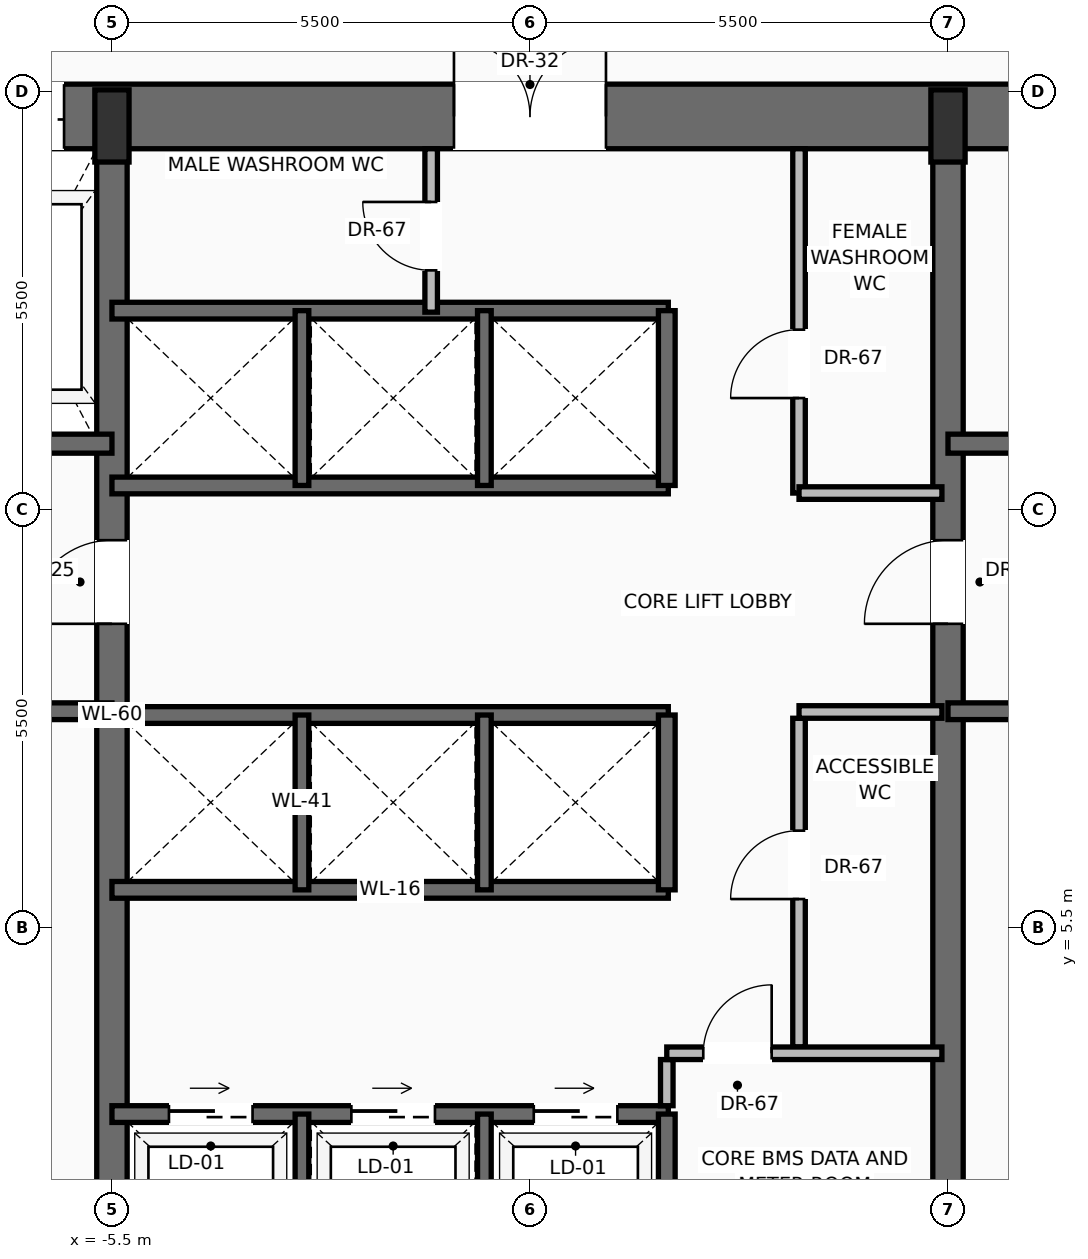
"""IFC4 building model, lengths in metres.
Left out: names, types, materials, properties, quantities, classifications, styles, units other than length and angle.
Written with IfcOpenShell. Run it as: python <this file> out.ifc"""

import sys

from ifc_helpers import new_model, si_unit, direction, frame, frame_2d, origin, origin_2d, place, context, subcontext, project, spatial, rectangle, extrude, source, transform, mapped, element, fill, save


model = new_model("IFC4")
c1 = context("Model", 3, precision=1e-05, world=origin(), true_north=direction((0.0, 1.0)))
c2 = subcontext(c1, "Body", "Model", "MODEL_VIEW")
j1 = project(units=[si_unit("LENGTHUNIT", "METRE"), si_unit("PLANEANGLEUNIT", "RADIAN")], contexts=[c1])
p1 = place(None, origin())
s1 = spatial("IfcSite", under=j1, at=p1, CompositionType="ELEMENT")
p2 = place(p1, origin())
s2 = spatial("IfcBuilding", under=s1, at=p2, CompositionType="ELEMENT")
p3 = place(p2, frame((0.0, 0.0, 42.3)))
s3 = spatial("IfcBuildingStorey", under=s2, at=p3, CompositionType="ELEMENT", Elevation=42.3)
p4 = place(p3, frame((-11.0, 16.175, 0.0), z_axis=(0.0, 0.0, 1.0), x_axis=(1.0, 0.0, 0.0)))
e1 = element("IfcWall", 1, at=p4, inside=s3, PredefinedType="SHEAR", context=c2, shape_type="SweptSolid", body=[
    extrude(rectangle(XDim=22.0, YDim=0.85, at=frame_2d((11.0, 0.0))), origin(), (0.0, 0.0, 1.0), 3.45),
])
p5 = place(p4, frame((3.57, 0.0, 0.0)))
e2 = element("IfcOpeningElement", 2, at=p5, cuts=e1, PredefinedType="OPENING", context=c2, shape_type="SweptSolid", body=[
    extrude(rectangle(XDim=1.3, YDim=2.3, at=frame_2d((0.65, 1.15))), frame((0.0, 0.435, 0.0), z_axis=(0.0, -1.0, 0.0), x_axis=(1.0, 0.0, 0.0)), (0.0, 0.0, 1.0), 0.87),
])
p6 = place(p4, frame((10.0, 0.0, 0.0)))
e3 = element("IfcOpeningElement", 3, at=p6, cuts=e1, PredefinedType="OPENING", context=c2, shape_type="SweptSolid", body=[
    extrude(rectangle(XDim=2.0, YDim=2.4, at=frame_2d((1.0, 1.2))), frame((0.0, 0.435, 0.0), z_axis=(0.0, -1.0, 0.0), x_axis=(1.0, 0.0, 0.0)), (0.0, 0.0, 1.0), 0.87),
])
p7 = place(p3, frame((-5.5, 0.425, 0.0), z_axis=(0.0, 0.0, 1.0), x_axis=(0.0, 1.0, 0.0)))
e4 = element("IfcWall", 4, at=p7, inside=s3, PredefinedType="SHEAR", context=c2, shape_type="SweptSolid", body=[
    extrude(rectangle(XDim=15.75, YDim=0.4, at=frame_2d((7.875, 0.0))), origin(), (0.0, 0.0, 1.0), 3.45),
])
p8 = place(p7, frame((9.075, 0.0, 0.0)))
e5 = element("IfcOpeningElement", 5, at=p8, cuts=e4, PredefinedType="OPENING", context=c2, shape_type="SweptSolid", body=[
    extrude(rectangle(XDim=1.1, YDim=2.2, at=frame_2d((0.55, 1.1))), frame((0.0, 0.21, 0.0), z_axis=(0.0, -1.0, 0.0), x_axis=(1.0, 0.0, 0.0)), (0.0, 0.0, 1.0), 0.42),
])
p9 = place(p3, frame((5.5, 0.425, 0.0), z_axis=(0.0, 0.0, 1.0), x_axis=(0.0, 1.0, 0.0)))
e6 = element("IfcWall", 6, at=p9, inside=s3, PredefinedType="SHEAR", context=c2, shape_type="SweptSolid", body=[
    extrude(rectangle(XDim=15.75, YDim=0.4, at=frame_2d((7.875, 0.0))), origin(), (0.0, 0.0, 1.0), 3.45),
])
p10 = place(p9, frame((9.075, 0.0, 0.0)))
e7 = element("IfcOpeningElement", 7, at=p10, cuts=e6, PredefinedType="OPENING", context=c2, shape_type="SweptSolid", body=[
    extrude(rectangle(XDim=1.1, YDim=2.2, at=frame_2d((0.55, 1.1))), frame((0.0, 0.21, 0.0), z_axis=(0.0, -1.0, 0.0), x_axis=(1.0, 0.0, 0.0)), (0.0, 0.0, 1.0), 0.42),
])
m1 = source(origin(), c2, "Body", "SweptSolid", [
    extrude(rectangle(XDim=0.45, YDim=0.95, at=origin_2d()), origin(), (0.0, 0.0, 1.0), 3.7),
])
for number, where, z_axis, x_axis in (
    (8, (-5.5, 16.05, 0.0), (0.0, 0.0, 1.0), (1.0, 0.0, 0.0)),
    (9, (5.5, 16.05, 0.0), (0.0, 0.0, 1.0), (1.0, 0.0, 0.0)),
):
    element("IfcColumn", number, at=place(p3, frame(where, z_axis=z_axis, x_axis=x_axis)), inside=s3, PredefinedType="PILASTER", context=c2, shape_type="MappedRepresentation", body=[
        mapped(m1, transform((0.0, 0.0, 0.0), scale=1.0)),
    ])
p11 = place(p3, frame((-5.5, 8.35, 0.0), z_axis=(0.0, 0.0, 1.0), x_axis=(-1.0, 0.0, 0.0)))
e10 = element("IfcWall", 10, at=p11, inside=s3, PredefinedType="SOLIDWALL", context=c2, shape_type="SweptSolid", body=[
    extrude(rectangle(XDim=4.65, YDim=0.22, at=frame_2d((2.325, 0.0))), origin(), (0.0, 0.0, 1.0), 3.45),
])
p12 = place(p11, frame((2.5, 0.0, 0.0)))
e11 = element("IfcOpeningElement", 11, at=p12, cuts=e10, PredefinedType="OPENING", context=c2, shape_type="SweptSolid", body=[
    extrude(rectangle(XDim=1.15, YDim=2.2, at=frame_2d((0.575, 1.1))), frame((0.0, 0.12, 0.0), z_axis=(0.0, -1.0, 0.0), x_axis=(1.0, 0.0, 0.0)), (0.0, 0.0, 1.0), 0.24),
])
p13 = place(p3, frame((-5.5, 11.87, 0.0), z_axis=(0.0, 0.0, 1.0), x_axis=(-1.0, 0.0, 0.0)))
e12 = element("IfcWall", 12, at=p13, inside=s3, PredefinedType="SOLIDWALL", context=c2, shape_type="SweptSolid", body=[
    extrude(rectangle(XDim=4.65, YDim=0.25, at=frame_2d((2.325, 0.0))), origin(), (0.0, 0.0, 1.0), 3.45),
])
p14 = place(p13, frame((2.95, 0.0, 0.0)))
e13 = element("IfcOpeningElement", 13, at=p14, cuts=e12, PredefinedType="OPENING", context=c2, shape_type="SweptSolid", body=[
    extrude(rectangle(XDim=1.2, YDim=2.25, at=frame_2d((0.6, 1.125))), frame((0.0, 0.135, 0.0), z_axis=(0.0, -1.0, 0.0), x_axis=(1.0, 0.0, 0.0)), (0.0, 0.0, 1.0), 0.27),
])
p15 = place(p3, frame((10.15, 8.35, 0.0), z_axis=(0.0, 0.0, 1.0), x_axis=(-1.0, 0.0, 0.0)))
e14 = element("IfcWall", 14, at=p15, inside=s3, PredefinedType="SOLIDWALL", context=c2, shape_type="SweptSolid", body=[
    extrude(rectangle(XDim=4.65, YDim=0.22, at=frame_2d((2.325, 0.0))), origin(), (0.0, 0.0, 1.0), 3.45),
])
p16 = place(p15, frame((1.0, 0.0, 0.0)))
e15 = element("IfcOpeningElement", 15, at=p16, cuts=e14, PredefinedType="OPENING", context=c2, shape_type="SweptSolid", body=[
    extrude(rectangle(XDim=1.15, YDim=2.2, at=frame_2d((0.575, 1.1))), frame((0.0, 0.12, 0.0), z_axis=(0.0, -1.0, 0.0), x_axis=(1.0, 0.0, 0.0)), (0.0, 0.0, 1.0), 0.24),
])
p17 = place(p3, frame((10.15, 11.87, 0.0), z_axis=(0.0, 0.0, 1.0), x_axis=(-1.0, 0.0, 0.0)))
e16 = element("IfcWall", 16, at=p17, inside=s3, PredefinedType="SOLIDWALL", context=c2, shape_type="SweptSolid", body=[
    extrude(rectangle(XDim=4.65, YDim=0.25, at=frame_2d((2.325, 0.0))), origin(), (0.0, 0.0, 1.0), 3.45),
])
p18 = place(p17, frame((0.5, 0.0, 0.0)))
e17 = element("IfcOpeningElement", 17, at=p18, cuts=e16, PredefinedType="OPENING", context=c2, shape_type="SweptSolid", body=[
    extrude(rectangle(XDim=1.2, YDim=2.25, at=frame_2d((0.6, 1.125))), frame((0.0, 0.135, 0.0), z_axis=(0.0, -1.0, 0.0), x_axis=(1.0, 0.0, 0.0)), (0.0, 0.0, 1.0), 0.27),
])
p19 = place(p3, frame((-5.5, 3.05, 0.0), z_axis=(0.0, 0.0, 1.0), x_axis=(1.0, 0.0, 0.0)))
e18 = element("IfcWall", 18, at=p19, inside=s3, PredefinedType="SOLIDWALL", context=c2, shape_type="SweptSolid", body=[
    extrude(rectangle(XDim=7.32, YDim=0.22, at=frame_2d((3.66, 0.0))), origin(), (0.0, 0.0, 1.0), 3.45),
])
p20 = place(p19, frame((0.75, 0.0, 0.0)))
e19 = element("IfcOpeningElement", 19, at=p20, cuts=e18, PredefinedType="OPENING", context=c2, shape_type="SweptSolid", body=[
    extrude(rectangle(XDim=1.1, YDim=2.2, at=frame_2d((0.55, 1.1))), frame((0.0, 0.12, 0.0), z_axis=(0.0, -1.0, 0.0), x_axis=(1.0, 0.0, 0.0)), (0.0, 0.0, 1.0), 0.24),
])
p21 = place(p19, frame((3.15, 0.0, 0.0)))
e20 = element("IfcOpeningElement", 20, at=p21, cuts=e18, PredefinedType="OPENING", context=c2, shape_type="SweptSolid", body=[
    extrude(rectangle(XDim=1.1, YDim=2.2, at=frame_2d((0.55, 1.1))), frame((0.0, 0.12, 0.0), z_axis=(0.0, -1.0, 0.0), x_axis=(1.0, 0.0, 0.0)), (0.0, 0.0, 1.0), 0.24),
])
p22 = place(p19, frame((5.55, 0.0, 0.0)))
e21 = element("IfcOpeningElement", 21, at=p22, cuts=e18, PredefinedType="OPENING", context=c2, shape_type="SweptSolid", body=[
    extrude(rectangle(XDim=1.1, YDim=2.2, at=frame_2d((0.55, 1.1))), frame((0.0, 0.12, 0.0), z_axis=(0.0, -1.0, 0.0), x_axis=(1.0, 0.0, 0.0)), (0.0, 0.0, 1.0), 0.24),
])
p23 = place(p3, frame((1.8, 0.85, 0.0), z_axis=(0.0, 0.0, 1.0), x_axis=(0.0, 1.0, 0.0)))
e22 = element("IfcWall", 22, at=p23, inside=s3, PredefinedType="SOLIDWALL", context=c2, shape_type="SweptSolid", body=[
    extrude(rectangle(XDim=2.2, YDim=0.22, at=frame_2d((1.1, 0.0))), origin(), (0.0, 0.0, 1.0), 3.45),
])
for number, where, z_axis, x_axis in (
    (23, (-3.0, 0.85, 0.0), (0.0, 0.0, 1.0), (0.0, 1.0, 0.0)),
    (24, (-0.6, 0.85, 0.0), (0.0, 0.0, 1.0), (0.0, 1.0, 0.0)),
):
    element("IfcWall", number, at=place(p3, frame(where, z_axis=z_axis, x_axis=x_axis)), inside=s3, PredefinedType="SOLIDWALL", context=c2, shape_type="SweptSolid", body=[
        extrude(rectangle(XDim=2.2, YDim=0.18, at=frame_2d((1.1, 0.0))), origin(), (0.0, 0.0, 1.0), 3.45),
    ])
p24 = place(p3, frame((1.8, 3.16, 0.0), z_axis=(0.0, 0.0, 1.0), x_axis=(0.0, 1.0, 0.0)))
e25 = element("IfcWall", 25, at=p24, inside=s3, PredefinedType="PARTITIONING", context=c2, shape_type="SweptSolid", body=[
    extrude(rectangle(XDim=0.608, YDim=0.165, at=frame_2d((0.304, 0.0))), origin(), (0.0, 0.0, 1.0), 3.442),
])
p25 = place(p3, frame((3.54, 3.933, 0.0), z_axis=(0.0, 0.0, 1.0), x_axis=(0.0, 1.0, 0.0)))
e26 = element("IfcWall", 26, at=p25, inside=s3, PredefinedType="PARTITIONING", context=c2, shape_type="SweptSolid", body=[
    extrude(rectangle(XDim=4.325, YDim=0.165, at=frame_2d((2.163, 0.0))), origin(), (0.0, 0.0, 1.0), 3.442),
])
p26 = place(p25, frame((1.946, 0.0, 0.0)))
e27 = element("IfcOpeningElement", 27, at=p26, cuts=e26, PredefinedType="OPENING", context=c2, shape_type="SweptSolid", body=[
    extrude(rectangle(XDim=0.9, YDim=2.1, at=frame_2d((0.45, 1.05))), frame((0.0, 0.093, 0.0), z_axis=(0.0, -1.0, 0.0), x_axis=(1.0, 0.0, 0.0)), (0.0, 0.0, 1.0), 0.185),
])
p27 = place(p3, frame((3.54, 8.34, 0.0), z_axis=(0.0, 0.0, 1.0), x_axis=(1.0, 0.0, 0.0)))
e28 = element("IfcWall", 28, at=p27, inside=s3, PredefinedType="PARTITIONING", context=c2, shape_type="SweptSolid", body=[
    extrude(rectangle(XDim=1.88, YDim=0.165, at=frame_2d((0.94, 0.0))), origin(), (0.0, 0.0, 1.0), 3.442),
])
p28 = place(p3, frame((1.8, 3.85, 0.0), z_axis=(0.0, 0.0, 1.0), x_axis=(1.0, 0.0, 0.0)))
e29 = element("IfcWall", 29, at=p28, inside=s3, PredefinedType="PARTITIONING", context=c2, shape_type="SweptSolid", body=[
    extrude(rectangle(XDim=3.62, YDim=0.165, at=frame_2d((1.81, 0.0))), origin(), (0.0, 0.0, 1.0), 3.442),
])
p29 = place(p28, frame((0.48, 0.0, 0.0)))
e30 = element("IfcOpeningElement", 30, at=p29, cuts=e29, PredefinedType="OPENING", context=c2, shape_type="SweptSolid", body=[
    extrude(rectangle(XDim=0.9, YDim=2.1, at=frame_2d((0.45, 1.05))), frame((0.0, 0.093, 0.0), z_axis=(0.0, -1.0, 0.0), x_axis=(1.0, 0.0, 0.0)), (0.0, 0.0, 1.0), 0.185),
])
for number, where, z_axis, x_axis in (
    (31, (-5.5, 6.0, 0.0), (0.0, 0.0, 1.0), (1.0, 0.0, 0.0)),
    (32, (-5.5, 8.3, 0.0), (0.0, 0.0, 1.0), (1.0, 0.0, 0.0)),
):
    element("IfcWall", number, at=place(p3, frame(where, z_axis=z_axis, x_axis=x_axis)), inside=s3, PredefinedType="SOLIDWALL", context=c2, shape_type="SweptSolid", body=[
        extrude(rectangle(XDim=7.32, YDim=0.22, at=frame_2d((3.66, 0.0))), origin(), (0.0, 0.0, 1.0), 3.45),
    ])
p30 = place(p3, frame((1.8, 6.0, 0.0), z_axis=(0.0, 0.0, 1.0), x_axis=(0.0, 1.0, 0.0)))
e33 = element("IfcWall", 33, at=p30, inside=s3, PredefinedType="SOLIDWALL", context=c2, shape_type="SweptSolid", body=[
    extrude(rectangle(XDim=2.3, YDim=0.22, at=frame_2d((1.15, 0.0))), origin(), (0.0, 0.0, 1.0), 3.45),
])
for number, where, z_axis, x_axis in (
    (34, (-3.0, 6.0, 0.0), (0.0, 0.0, 1.0), (0.0, 1.0, 0.0)),
    (35, (-0.6, 6.0, 0.0), (0.0, 0.0, 1.0), (0.0, 1.0, 0.0)),
):
    element("IfcWall", number, at=place(p3, frame(where, z_axis=z_axis, x_axis=x_axis)), inside=s3, PredefinedType="SOLIDWALL", context=c2, shape_type="SweptSolid", body=[
        extrude(rectangle(XDim=2.3, YDim=0.18, at=frame_2d((1.15, 0.0))), origin(), (0.0, 0.0, 1.0), 3.45),
    ])
for number, where, z_axis, x_axis in (
    (36, (-5.5, 11.32, 0.0), (0.0, 0.0, 1.0), (1.0, 0.0, 0.0)),
    (37, (-5.5, 13.62, 0.0), (0.0, 0.0, 1.0), (1.0, 0.0, 0.0)),
):
    element("IfcWall", number, at=place(p3, frame(where, z_axis=z_axis, x_axis=x_axis)), inside=s3, PredefinedType="SOLIDWALL", context=c2, shape_type="SweptSolid", body=[
        extrude(rectangle(XDim=7.32, YDim=0.22, at=frame_2d((3.66, 0.0))), origin(), (0.0, 0.0, 1.0), 3.45),
    ])
p31 = place(p3, frame((1.8, 11.32, 0.0), z_axis=(0.0, 0.0, 1.0), x_axis=(0.0, 1.0, 0.0)))
e38 = element("IfcWall", 38, at=p31, inside=s3, PredefinedType="SOLIDWALL", context=c2, shape_type="SweptSolid", body=[
    extrude(rectangle(XDim=2.3, YDim=0.22, at=frame_2d((1.15, 0.0))), origin(), (0.0, 0.0, 1.0), 3.45),
])
for number, where, z_axis, x_axis in (
    (39, (-3.0, 11.32, 0.0), (0.0, 0.0, 1.0), (0.0, 1.0, 0.0)),
    (40, (-0.6, 11.32, 0.0), (0.0, 0.0, 1.0), (0.0, 1.0, 0.0)),
):
    element("IfcWall", number, at=place(p3, frame(where, z_axis=z_axis, x_axis=x_axis)), inside=s3, PredefinedType="SOLIDWALL", context=c2, shape_type="SweptSolid", body=[
        extrude(rectangle(XDim=2.3, YDim=0.18, at=frame_2d((1.15, 0.0))), origin(), (0.0, 0.0, 1.0), 3.45),
    ])
p32 = place(p3, frame((-1.3, 13.6, 0.0), z_axis=(0.0, 0.0, 1.0), x_axis=(0.0, 1.0, 0.0)))
e41 = element("IfcWall", 41, at=p32, inside=s3, PredefinedType="PARTITIONING", context=c2, shape_type="SweptSolid", body=[
    extrude(rectangle(XDim=2.15, YDim=0.165, at=frame_2d((1.075, 0.0))), origin(), (0.0, 0.0, 1.0), 3.442),
])
p33 = place(p32, frame((0.55, 0.0, 0.0)))
e42 = element("IfcOpeningElement", 42, at=p33, cuts=e41, PredefinedType="OPENING", context=c2, shape_type="SweptSolid", body=[
    extrude(rectangle(XDim=0.9, YDim=2.1, at=frame_2d((0.45, 1.05))), frame((0.0, 0.093, 0.0), z_axis=(0.0, -1.0, 0.0), x_axis=(1.0, 0.0, 0.0)), (0.0, 0.0, 1.0), 0.185),
])
p34 = place(p3, frame((3.54, 11.22, 0.0), z_axis=(0.0, 0.0, 1.0), x_axis=(0.0, 1.0, 0.0)))
e43 = element("IfcWall", 43, at=p34, inside=s3, PredefinedType="PARTITIONING", context=c2, shape_type="SweptSolid", body=[
    extrude(rectangle(XDim=4.53, YDim=0.165, at=frame_2d((2.265, 0.0))), origin(), (0.0, 0.0, 1.0), 3.442),
])
p35 = place(p34, frame((1.25, 0.0, 0.0)))
e44 = element("IfcOpeningElement", 44, at=p35, cuts=e43, PredefinedType="OPENING", context=c2, shape_type="SweptSolid", body=[
    extrude(rectangle(XDim=0.9, YDim=2.1, at=frame_2d((0.45, 1.05))), frame((0.0, 0.093, 0.0), z_axis=(0.0, -1.0, 0.0), x_axis=(1.0, 0.0, 0.0)), (0.0, 0.0, 1.0), 0.185),
])
p36 = place(p3, frame((3.54, 11.22, 0.0), z_axis=(0.0, 0.0, 1.0), x_axis=(1.0, 0.0, 0.0)))
e45 = element("IfcWall", 45, at=p36, inside=s3, PredefinedType="PARTITIONING", context=c2, shape_type="SweptSolid", body=[
    extrude(rectangle(XDim=1.88, YDim=0.165, at=frame_2d((0.94, 0.0))), origin(), (0.0, 0.0, 1.0), 3.442),
])
m2 = source(origin(), c2, "Body", "SweptSolid", [
    extrude(rectangle(XDim=1.1, YDim=2.2, at=frame_2d((0.55, 1.1))), frame((0.0, 0.025, 0.0), z_axis=(0.0, -1.0, 0.0), x_axis=(1.0, 0.0, 0.0)), (0.0, 0.0, 1.0), 0.05),
])
p37 = place(p8, origin())
e46 = element("IfcDoor", 46, at=p37, inside=s3, OperationType="SINGLE_SWING_LEFT", PredefinedType="DOOR", context=c2, shape_type="MappedRepresentation", body=[
    mapped(m2, transform((0.0, 0.0, 0.0), scale=1.0)),
])
fill(e5, e46)
m3 = source(origin(), c2, "Body", "SweptSolid", [
    extrude(rectangle(XDim=1.3, YDim=2.3, at=frame_2d((0.65, 1.15))), frame((0.0, 0.025, 0.0), z_axis=(0.0, -1.0, 0.0), x_axis=(1.0, 0.0, 0.0)), (0.0, 0.0, 1.0), 0.05),
])
p38 = place(p5, origin())
e47 = element("IfcDoor", 47, at=p38, inside=s3, OperationType="SLIDING_TO_RIGHT", PredefinedType="DOOR", context=c2, shape_type="MappedRepresentation", body=[
    mapped(m3, transform((0.0, 0.0, 0.0), scale=1.0)),
])
fill(e2, e47)
p39 = place(p10, origin())
e48 = element("IfcDoor", 48, at=p39, inside=s3, OperationType="SINGLE_SWING_LEFT", PredefinedType="DOOR", context=c2, shape_type="MappedRepresentation", body=[
    mapped(m2, transform((0.0, 0.0, 0.0), scale=1.0)),
])
fill(e7, e48)
m4 = source(origin(), c2, "Body", "SweptSolid", [
    extrude(rectangle(XDim=2.0, YDim=2.4, at=frame_2d((1.0, 1.2))), frame((0.0, 0.025, 0.0), z_axis=(0.0, -1.0, 0.0), x_axis=(1.0, 0.0, 0.0)), (0.0, 0.0, 1.0), 0.05),
])
p40 = place(p6, origin())
e49 = element("IfcDoor", 49, at=p40, inside=s3, OperationType="DOUBLE_DOOR_SINGLE_SWING", PredefinedType="DOOR", context=c2, shape_type="MappedRepresentation", body=[
    mapped(m4, transform((0.0, 0.0, 0.0), scale=1.0)),
])
fill(e3, e49)
m5 = source(origin(), c2, "Body", "SweptSolid", [
    extrude(rectangle(XDim=1.1, YDim=2.2, at=frame_2d((0.55, 1.1))), frame((0.0, 0.025, 0.0), z_axis=(0.0, -1.0, 0.0), x_axis=(1.0, 0.0, 0.0)), (0.0, 0.0, 1.0), 0.05),
])
p41 = place(p20, origin())
e50 = element("IfcDoor", 50, at=p41, inside=s3, OperationType="SLIDING_TO_RIGHT", PredefinedType="DOOR", context=c2, shape_type="MappedRepresentation", body=[
    mapped(m5, transform((0.0, 0.0, 0.0), scale=1.0)),
])
fill(e19, e50)
p42 = place(p21, origin())
e51 = element("IfcDoor", 51, at=p42, inside=s3, OperationType="SLIDING_TO_RIGHT", PredefinedType="DOOR", context=c2, shape_type="MappedRepresentation", body=[
    mapped(m5, transform((0.0, 0.0, 0.0), scale=1.0)),
])
fill(e20, e51)
p43 = place(p22, origin())
e52 = element("IfcDoor", 52, at=p43, inside=s3, OperationType="SLIDING_TO_RIGHT", PredefinedType="DOOR", context=c2, shape_type="MappedRepresentation", body=[
    mapped(m5, transform((0.0, 0.0, 0.0), scale=1.0)),
])
fill(e21, e52)
m6 = source(origin(), c2, "Body", "SweptSolid", [
    extrude(rectangle(XDim=0.9, YDim=2.1, at=frame_2d((0.45, 1.05))), frame((0.0, 0.025, 0.0), z_axis=(0.0, -1.0, 0.0), x_axis=(1.0, 0.0, 0.0)), (0.0, 0.0, 1.0), 0.05),
])
p44 = place(p29, origin())
e53 = element("IfcDoor", 53, at=p44, inside=s3, OperationType="SINGLE_SWING_RIGHT", PredefinedType="DOOR", context=c2, shape_type="MappedRepresentation", body=[
    mapped(m6, transform((0.0, 0.0, 0.0), scale=1.0)),
])
fill(e30, e53)
p45 = place(p26, origin())
e54 = element("IfcDoor", 54, at=p45, inside=s3, OperationType="SINGLE_SWING_LEFT", PredefinedType="DOOR", context=c2, shape_type="MappedRepresentation", body=[
    mapped(m6, transform((0.0, 0.0, 0.0), scale=1.0)),
])
fill(e27, e54)
p46 = place(p33, origin())
e55 = element("IfcDoor", 55, at=p46, inside=s3, OperationType="SINGLE_SWING_RIGHT", PredefinedType="DOOR", context=c2, shape_type="MappedRepresentation", body=[
    mapped(m6, transform((0.0, 0.0, 0.0), scale=1.0)),
])
fill(e42, e55)
p47 = place(p35, origin())
e56 = element("IfcDoor", 56, at=p47, inside=s3, OperationType="SINGLE_SWING_LEFT", PredefinedType="DOOR", context=c2, shape_type="MappedRepresentation", body=[
    mapped(m6, transform((0.0, 0.0, 0.0), scale=1.0)),
])
fill(e44, e56)
save(model, sys.argv[1])
